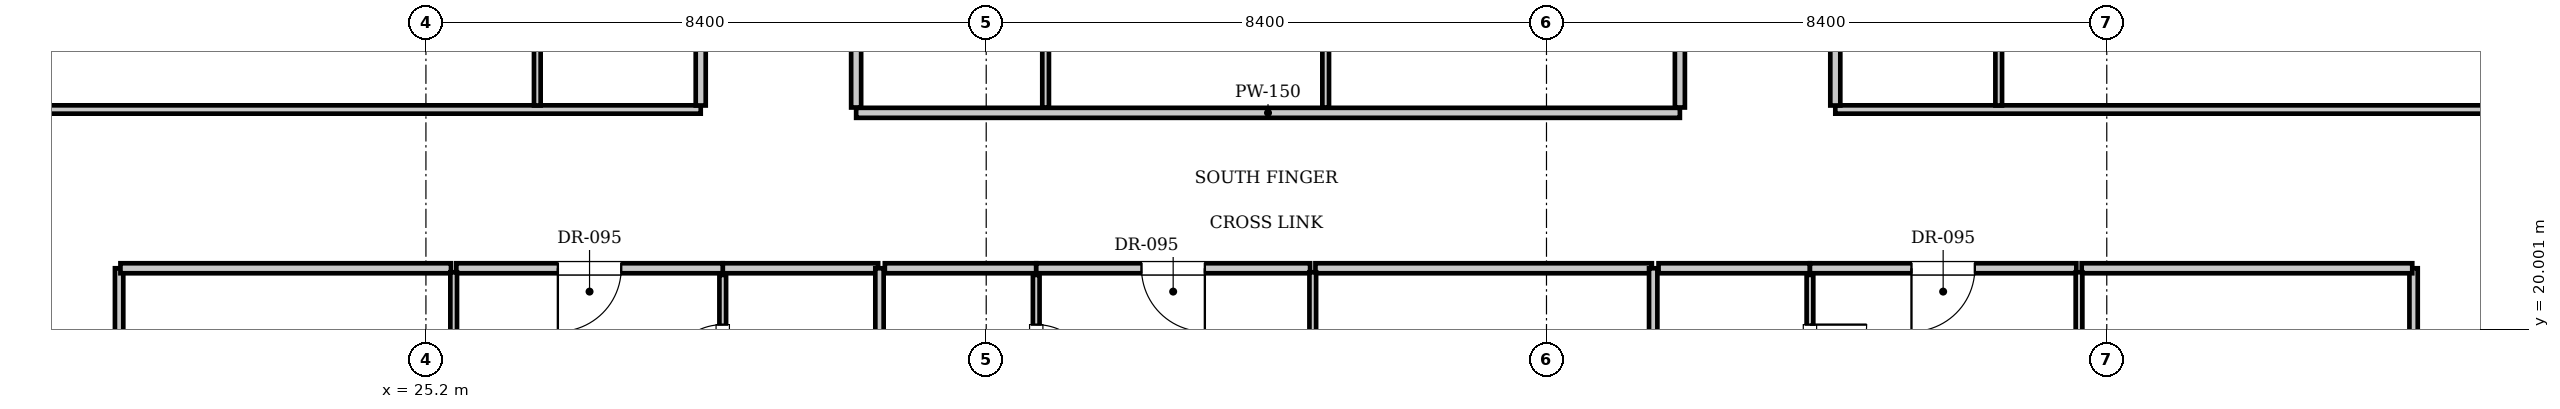
"""IFC4 building model, lengths in metres.
Left out: names, types, materials, properties, quantities, classifications, styles, units other than length and angle.
Written with IfcOpenShell. Run it as: python <this file> out.ifc"""

import sys

from ifc_helpers import new_model, si_unit, direction, frame, frame_2d, origin, place, context, subcontext, project, spatial, rectangle, extrude, element, fill, save


model = new_model("IFC4")
c1 = context("Model", 3, precision=1e-05, world=origin(), true_north=direction((0.0, 1.0)))
c2 = subcontext(c1, "Body", "Model", "MODEL_VIEW")
j1 = project(units=[si_unit("LENGTHUNIT", "METRE"), si_unit("PLANEANGLEUNIT", "RADIAN")], contexts=[c1])
p1 = place(None, origin())
s1 = spatial("IfcSite", under=j1, at=p1, CompositionType="ELEMENT")
p2 = place(p1, origin())
s2 = spatial("IfcBuilding", under=s1, at=p2, CompositionType="ELEMENT")
p3 = place(p2, frame((0.0, 0.0, 304.85)))
s3 = spatial("IfcBuildingStorey", under=s2, at=p3, CompositionType="ELEMENT", Elevation=304.85)
p4 = place(p3, frame((31.65, 23.25, 0.0), z_axis=(0.0, 0.0, 1.0), x_axis=(1.0, 0.0, 0.0)))
e1 = element("IfcWall", 1, at=p4, inside=s3, PredefinedType="PARTITIONING", context=c2, shape_type="SweptSolid", body=[
    extrude(rectangle(XDim=12.35, YDim=0.15, at=frame_2d((6.175, 0.0))), origin(), (0.0, 0.0, 1.0), 3.61),
])
for number, where, z_axis, x_axis in (
    (2, (31.65, 23.33, 0.0), (0.0, 0.0, 1.0), (0.0, 1.0, 0.0)),
    (3, (44.0, 23.33, 0.0), (0.0, 0.0, 1.0), (0.0, 1.0, 0.0)),
):
    element("IfcWall", number, at=place(p3, frame(where, z_axis=z_axis, x_axis=x_axis)), inside=s3, PredefinedType="PARTITIONING", context=c2, shape_type="SweptSolid", body=[
        extrude(rectangle(XDim=8.29, YDim=0.15, at=frame_2d((4.145, 0.0))), origin(), (0.0, 0.0, 1.0), 3.61),
    ])
for number, where, z_axis, x_axis in (
    (4, (34.49, 23.33, 0.0), (0.0, 0.0, 1.0), (0.0, 1.0, 0.0)),
    (5, (38.689, 23.33, 0.0), (0.0, 0.0, 1.0), (0.0, 1.0, 0.0)),
):
    element("IfcWall", number, at=place(p3, frame(where, z_axis=z_axis, x_axis=x_axis)), inside=s3, PredefinedType="PARTITIONING", context=c2, shape_type="SweptSolid", body=[
        extrude(rectangle(XDim=8.29, YDim=0.1, at=frame_2d((4.145, 0.0))), origin(), (0.0, 0.0, 1.0), 3.61),
    ])
for number, where, z_axis, x_axis in (
    (6, (20.6, 14.4, 0.0), (0.0, 0.0, 1.0), (0.0, 1.0, 0.0)),
    (7, (55.0, 14.4, 0.0), (0.0, 0.0, 1.0), (0.0, 1.0, 0.0)),
):
    element("IfcWall", number, at=place(p3, frame(where, z_axis=z_axis, x_axis=x_axis)), inside=s3, PredefinedType="PARTITIONING", context=c2, shape_type="SweptSolid", body=[
        extrude(rectangle(XDim=6.52, YDim=0.125, at=frame_2d((3.26, 0.0))), origin(), (0.0, 0.0, 1.0), 3.61),
    ])
p5 = place(p3, frame((29.65, 20.92, 0.0), z_axis=(0.0, 0.0, 1.0), x_axis=(1.0, 0.0, 0.0)))
e8 = element("IfcWall", 8, at=p5, inside=s3, PredefinedType="PARTITIONING", context=c2, shape_type="SweptSolid", body=[
    extrude(rectangle(XDim=2.33, YDim=0.15, at=frame_2d((1.165, 0.0))), origin(), (0.0, 0.0, 1.0), 3.61),
])
p6 = place(p3, frame((29.65, 18.48, 0.0), z_axis=(0.0, 0.0, 1.0), x_axis=(0.0, 1.0, 0.0)))
e9 = element("IfcWall", 9, at=p6, inside=s3, PredefinedType="PARTITIONING", context=c2, shape_type="SweptSolid", body=[
    extrude(rectangle(XDim=2.34, YDim=0.1, at=frame_2d((1.17, 0.0))), origin(), (0.0, 0.0, 1.0), 3.61),
])
p7 = place(p6, frame((0.745, 0.0, 0.0)))
e10 = element("IfcOpeningElement", 10, at=p7, cuts=e9, PredefinedType="OPENING", context=c2, shape_type="SweptSolid", body=[
    extrude(rectangle(XDim=0.85, YDim=2.1, at=frame_2d((0.425, 1.05))), frame((0.0, 0.06, 0.0), z_axis=(0.0, -1.0, 0.0), x_axis=(1.0, 0.0, 0.0)), (0.0, 0.0, 1.0), 0.12),
])
p8 = place(p3, frame((20.62, 20.92, 0.0), z_axis=(0.0, 0.0, 1.0), x_axis=(1.0, 0.0, 0.0)))
e11 = element("IfcWall", 11, at=p8, inside=s3, PredefinedType="PARTITIONING", context=c2, shape_type="SweptSolid", body=[
    extrude(rectangle(XDim=4.956, YDim=0.15, at=frame_2d((2.478, 0.0))), origin(), (0.0, 0.0, 1.0), 3.61),
])
p9 = place(p3, frame((25.656, 20.92, 0.0), z_axis=(0.0, 0.0, 1.0), x_axis=(1.0, 0.0, 0.0)))
e12 = element("IfcWall", 12, at=p9, inside=s3, PredefinedType="PARTITIONING", context=c2, shape_type="SweptSolid", body=[
    extrude(rectangle(XDim=3.994, YDim=0.15, at=frame_2d((1.997, 0.0))), origin(), (0.0, 0.0, 1.0), 3.61),
])
p10 = place(p9, frame((1.522, 0.0, 0.0)))
e13 = element("IfcOpeningElement", 13, at=p10, cuts=e12, PredefinedType="OPENING", context=c2, shape_type="SweptSolid", body=[
    extrude(rectangle(XDim=0.95, YDim=2.15, at=frame_2d((0.475, 1.075))), frame((0.0, 0.085, 0.0), z_axis=(0.0, -1.0, 0.0), x_axis=(1.0, 0.0, 0.0)), (0.0, 0.0, 1.0), 0.17),
])
p11 = place(p3, frame((25.616, 9.23, 0.0), z_axis=(0.0, 0.0, 1.0), x_axis=(0.0, 1.0, 0.0)))
e14 = element("IfcWall", 14, at=p11, inside=s3, PredefinedType="PARTITIONING", context=c2, shape_type="SweptSolid", body=[
    extrude(rectangle(XDim=11.63, YDim=0.1, at=frame_2d((5.815, 0.0))), origin(), (0.0, 0.0, 1.0), 3.61),
])
p12 = place(p11, frame((1.6, 0.0, 0.0)))
e15 = element("IfcOpeningElement", 15, at=p12, cuts=e14, PredefinedType="OPENING", context=c2, shape_type="SweptSolid", body=[
    extrude(rectangle(XDim=0.9, YDim=2.1, at=frame_2d((0.45, 1.05))), frame((0.0, 0.06, 0.0), z_axis=(0.0, -1.0, 0.0), x_axis=(1.0, 0.0, 0.0)), (0.0, 0.0, 1.0), 0.12),
])
p13 = place(p3, frame((32.0, 9.3, 0.0), z_axis=(0.0, 0.0, 1.0), x_axis=(0.0, 1.0, 0.0)))
e16 = element("IfcWall", 16, at=p13, inside=s3, PredefinedType="PARTITIONING", context=c2, shape_type="SweptSolid", body=[
    extrude(rectangle(XDim=11.62, YDim=0.125, at=frame_2d((5.81, 0.0))), origin(), (0.0, 0.0, 1.0), 3.61),
])
p14 = place(p3, frame((32.08, 20.92, 0.0), z_axis=(0.0, 0.0, 1.0), x_axis=(1.0, 0.0, 0.0)))
e17 = element("IfcWall", 17, at=p14, inside=s3, PredefinedType="PARTITIONING", context=c2, shape_type="SweptSolid", body=[
    extrude(rectangle(XDim=2.27, YDim=0.15, at=frame_2d((1.135, 0.0))), origin(), (0.0, 0.0, 1.0), 3.61),
])
p15 = place(p3, frame((34.35, 18.48, 0.0), z_axis=(0.0, 0.0, 1.0), x_axis=(0.0, 1.0, 0.0)))
e18 = element("IfcWall", 18, at=p15, inside=s3, PredefinedType="PARTITIONING", context=c2, shape_type="SweptSolid", body=[
    extrude(rectangle(XDim=2.34, YDim=0.1, at=frame_2d((1.17, 0.0))), origin(), (0.0, 0.0, 1.0), 3.61),
])
p16 = place(p15, frame((0.745, 0.0, 0.0)))
e19 = element("IfcOpeningElement", 19, at=p16, cuts=e18, PredefinedType="OPENING", context=c2, shape_type="SweptSolid", body=[
    extrude(rectangle(XDim=0.85, YDim=2.1, at=frame_2d((0.425, 1.05))), frame((0.0, 0.06, 0.0), z_axis=(0.0, -1.0, 0.0), x_axis=(1.0, 0.0, 0.0)), (0.0, 0.0, 1.0), 0.12),
])
p17 = place(p3, frame((34.35, 20.92, 0.0), z_axis=(0.0, 0.0, 1.0), x_axis=(1.0, 0.0, 0.0)))
e20 = element("IfcWall", 20, at=p17, inside=s3, PredefinedType="PARTITIONING", context=c2, shape_type="SweptSolid", body=[
    extrude(rectangle(XDim=4.106, YDim=0.15, at=frame_2d((2.053, 0.0))), origin(), (0.0, 0.0, 1.0), 3.61),
])
p18 = place(p17, frame((1.578, 0.0, 0.0)))
e21 = element("IfcOpeningElement", 21, at=p18, cuts=e20, PredefinedType="OPENING", context=c2, shape_type="SweptSolid", body=[
    extrude(rectangle(XDim=0.95, YDim=2.15, at=frame_2d((0.475, 1.075))), frame((0.0, 0.085, 0.0), z_axis=(0.0, -1.0, 0.0), x_axis=(1.0, 0.0, 0.0)), (0.0, 0.0, 1.0), 0.17),
])
p19 = place(p3, frame((38.536, 20.92, 0.0), z_axis=(0.0, 0.0, 1.0), x_axis=(1.0, 0.0, 0.0)))
e22 = element("IfcWall", 22, at=p19, inside=s3, PredefinedType="PARTITIONING", context=c2, shape_type="SweptSolid", body=[
    extrude(rectangle(XDim=5.044, YDim=0.15, at=frame_2d((2.522, 0.0))), origin(), (0.0, 0.0, 1.0), 3.61),
])
p20 = place(p3, frame((38.496, 9.23, 0.0), z_axis=(0.0, 0.0, 1.0), x_axis=(0.0, 1.0, 0.0)))
e23 = element("IfcWall", 23, at=p20, inside=s3, PredefinedType="PARTITIONING", context=c2, shape_type="SweptSolid", body=[
    extrude(rectangle(XDim=11.63, YDim=0.1, at=frame_2d((5.815, 0.0))), origin(), (0.0, 0.0, 1.0), 3.61),
])
p21 = place(p20, frame((1.6, 0.0, 0.0)))
e24 = element("IfcOpeningElement", 24, at=p21, cuts=e23, PredefinedType="OPENING", context=c2, shape_type="SweptSolid", body=[
    extrude(rectangle(XDim=0.9, YDim=2.1, at=frame_2d((0.45, 1.05))), frame((0.0, 0.06, 0.0), z_axis=(0.0, -1.0, 0.0), x_axis=(1.0, 0.0, 0.0)), (0.0, 0.0, 1.0), 0.12),
])
p22 = place(p3, frame((43.6, 9.3, 0.0), z_axis=(0.0, 0.0, 1.0), x_axis=(0.0, 1.0, 0.0)))
e25 = element("IfcWall", 25, at=p22, inside=s3, PredefinedType="PARTITIONING", context=c2, shape_type="SweptSolid", body=[
    extrude(rectangle(XDim=11.62, YDim=0.125, at=frame_2d((5.81, 0.0))), origin(), (0.0, 0.0, 1.0), 3.61),
])
p23 = place(p3, frame((43.68, 20.92, 0.0), z_axis=(0.0, 0.0, 1.0), x_axis=(1.0, 0.0, 0.0)))
e26 = element("IfcWall", 26, at=p23, inside=s3, PredefinedType="PARTITIONING", context=c2, shape_type="SweptSolid", body=[
    extrude(rectangle(XDim=2.27, YDim=0.15, at=frame_2d((1.135, 0.0))), origin(), (0.0, 0.0, 1.0), 3.61),
])
p24 = place(p3, frame((45.95, 18.48, 0.0), z_axis=(0.0, 0.0, 1.0), x_axis=(0.0, 1.0, 0.0)))
e27 = element("IfcWall", 27, at=p24, inside=s3, PredefinedType="PARTITIONING", context=c2, shape_type="SweptSolid", body=[
    extrude(rectangle(XDim=2.34, YDim=0.1, at=frame_2d((1.17, 0.0))), origin(), (0.0, 0.0, 1.0), 3.61),
])
p25 = place(p24, frame((0.745, 0.0, 0.0)))
e28 = element("IfcOpeningElement", 28, at=p25, cuts=e27, PredefinedType="OPENING", context=c2, shape_type="SweptSolid", body=[
    extrude(rectangle(XDim=0.85, YDim=2.1, at=frame_2d((0.425, 1.05))), frame((0.0, 0.06, 0.0), z_axis=(0.0, -1.0, 0.0), x_axis=(1.0, 0.0, 0.0)), (0.0, 0.0, 1.0), 0.12),
])
p26 = place(p3, frame((45.95, 20.92, 0.0), z_axis=(0.0, 0.0, 1.0), x_axis=(1.0, 0.0, 0.0)))
e29 = element("IfcWall", 29, at=p26, inside=s3, PredefinedType="PARTITIONING", context=c2, shape_type="SweptSolid", body=[
    extrude(rectangle(XDim=3.994, YDim=0.15, at=frame_2d((1.997, 0.0))), origin(), (0.0, 0.0, 1.0), 3.61),
])
p27 = place(p26, frame((1.522, 0.0, 0.0)))
e30 = element("IfcOpeningElement", 30, at=p27, cuts=e29, PredefinedType="OPENING", context=c2, shape_type="SweptSolid", body=[
    extrude(rectangle(XDim=0.95, YDim=2.15, at=frame_2d((0.475, 1.075))), frame((0.0, 0.085, 0.0), z_axis=(0.0, -1.0, 0.0), x_axis=(1.0, 0.0, 0.0)), (0.0, 0.0, 1.0), 0.17),
])
p28 = place(p3, frame((50.024, 20.92, 0.0), z_axis=(0.0, 0.0, 1.0), x_axis=(1.0, 0.0, 0.0)))
e31 = element("IfcWall", 31, at=p28, inside=s3, PredefinedType="PARTITIONING", context=c2, shape_type="SweptSolid", body=[
    extrude(rectangle(XDim=4.956, YDim=0.15, at=frame_2d((2.478, 0.0))), origin(), (0.0, 0.0, 1.0), 3.61),
])
p29 = place(p3, frame((49.984, 9.23, 0.0), z_axis=(0.0, 0.0, 1.0), x_axis=(0.0, 1.0, 0.0)))
e32 = element("IfcWall", 32, at=p29, inside=s3, PredefinedType="PARTITIONING", context=c2, shape_type="SweptSolid", body=[
    extrude(rectangle(XDim=11.63, YDim=0.1, at=frame_2d((5.815, 0.0))), origin(), (0.0, 0.0, 1.0), 3.61),
])
p30 = place(p29, frame((1.6, 0.0, 0.0)))
e33 = element("IfcOpeningElement", 33, at=p30, cuts=e32, PredefinedType="OPENING", context=c2, shape_type="SweptSolid", body=[
    extrude(rectangle(XDim=0.9, YDim=2.1, at=frame_2d((0.45, 1.05))), frame((0.0, 0.06, 0.0), z_axis=(0.0, -1.0, 0.0), x_axis=(1.0, 0.0, 0.0)), (0.0, 0.0, 1.0), 0.12),
])
p31 = place(p3, frame((15.5, 23.3, 0.0), z_axis=(0.0, 0.0, 1.0), x_axis=(1.0, 0.0, 0.0)))
e34 = element("IfcWall", 34, at=p31, inside=s3, PredefinedType="PARTITIONING", context=c2, shape_type="SweptSolid", body=[
    extrude(rectangle(XDim=13.82, YDim=0.125, at=frame_2d((6.91, 0.0))), origin(), (0.0, 0.0, 1.0), 3.61),
])
p32 = place(p3, frame((46.33, 23.3, 0.0), z_axis=(0.0, 0.0, 1.0), x_axis=(1.0, 0.0, 0.0)))
e35 = element("IfcWall", 35, at=p32, inside=s3, PredefinedType="PARTITIONING", context=c2, shape_type="SweptSolid", body=[
    extrude(rectangle(XDim=13.77, YDim=0.125, at=frame_2d((6.885, 0.0))), origin(), (0.0, 0.0, 1.0), 3.61),
])
p33 = place(p3, frame((29.32, 23.36, 0.0), z_axis=(0.0, 0.0, 1.0), x_axis=(0.0, 1.0, 0.0)))
e36 = element("IfcWall", 36, at=p33, inside=s3, PredefinedType="PARTITIONING", context=c2, shape_type="SweptSolid", body=[
    extrude(rectangle(XDim=1.89, YDim=0.15, at=frame_2d((0.945, 0.0))), origin(), (0.0, 0.0, 1.0), 3.61),
])
p34 = place(p3, frame((26.87, 23.36, 0.0), z_axis=(0.0, 0.0, 1.0), x_axis=(0.0, 1.0, 0.0)))
e37 = element("IfcWall", 37, at=p34, inside=s3, PredefinedType="PARTITIONING", context=c2, shape_type="SweptSolid", body=[
    extrude(rectangle(XDim=1.89, YDim=0.1, at=frame_2d((0.945, 0.0))), origin(), (0.0, 0.0, 1.0), 3.61),
])
p35 = place(p3, frame((46.33, 23.36, 0.0), z_axis=(0.0, 0.0, 1.0), x_axis=(0.0, 1.0, 0.0)))
e38 = element("IfcWall", 38, at=p35, inside=s3, PredefinedType="PARTITIONING", context=c2, shape_type="SweptSolid", body=[
    extrude(rectangle(XDim=1.89, YDim=0.15, at=frame_2d((0.945, 0.0))), origin(), (0.0, 0.0, 1.0), 3.61),
])
p36 = place(p3, frame((48.78, 23.36, 0.0), z_axis=(0.0, 0.0, 1.0), x_axis=(0.0, 1.0, 0.0)))
e39 = element("IfcWall", 39, at=p36, inside=s3, PredefinedType="PARTITIONING", context=c2, shape_type="SweptSolid", body=[
    extrude(rectangle(XDim=1.89, YDim=0.1, at=frame_2d((0.945, 0.0))), origin(), (0.0, 0.0, 1.0), 3.61),
])
p37 = place(p7, origin())
e40 = element("IfcDoor", 40, at=p37, inside=s3, OperationType="SINGLE_SWING_LEFT", PredefinedType="DOOR", context=c2, shape_type="SweptSolid", body=[
    extrude(rectangle(XDim=0.85, YDim=2.1, at=frame_2d((0.425, 1.05))), frame((0.0, 0.025, 0.0), z_axis=(0.0, -1.0, 0.0), x_axis=(1.0, 0.0, 0.0)), (0.0, 0.0, 1.0), 0.05),
])
fill(e10, e40)
p38 = place(p10, frame((0.95, 0.0, 0.0), z_axis=(0.0, 0.0, 1.0), x_axis=(-1.0, 0.0, 0.0)))
e41 = element("IfcDoor", 41, at=p38, inside=s3, OperationType="SINGLE_SWING_RIGHT", PredefinedType="DOOR", context=c2, shape_type="SweptSolid", body=[
    extrude(rectangle(XDim=0.95, YDim=2.15, at=frame_2d((0.475, 1.075))), frame((0.0, 0.025, 0.0), z_axis=(0.0, -1.0, 0.0), x_axis=(1.0, 0.0, 0.0)), (0.0, 0.0, 1.0), 0.05),
])
fill(e13, e41)
p39 = place(p16, frame((0.85, 0.0, 0.0), z_axis=(0.0, 0.0, 1.0), x_axis=(-1.0, 0.0, 0.0)))
e42 = element("IfcDoor", 42, at=p39, inside=s3, OperationType="SINGLE_SWING_RIGHT", PredefinedType="DOOR", context=c2, shape_type="SweptSolid", body=[
    extrude(rectangle(XDim=0.85, YDim=2.1, at=frame_2d((0.425, 1.05))), frame((0.0, 0.025, 0.0), z_axis=(0.0, -1.0, 0.0), x_axis=(1.0, 0.0, 0.0)), (0.0, 0.0, 1.0), 0.05),
])
fill(e19, e42)
p40 = place(p18, frame((0.95, 0.0, 0.0), z_axis=(0.0, 0.0, 1.0), x_axis=(-1.0, 0.0, 0.0)))
e43 = element("IfcDoor", 43, at=p40, inside=s3, OperationType="SINGLE_SWING_LEFT", PredefinedType="DOOR", context=c2, shape_type="SweptSolid", body=[
    extrude(rectangle(XDim=0.95, YDim=2.15, at=frame_2d((0.475, 1.075))), frame((0.0, 0.025, 0.0), z_axis=(0.0, -1.0, 0.0), x_axis=(1.0, 0.0, 0.0)), (0.0, 0.0, 1.0), 0.05),
])
fill(e21, e43)
p41 = place(p25, frame((0.85, 0.0, 0.0), z_axis=(0.0, 0.0, 1.0), x_axis=(-1.0, 0.0, 0.0)))
e44 = element("IfcDoor", 44, at=p41, inside=s3, OperationType="SINGLE_SWING_LEFT", PredefinedType="DOOR", context=c2, shape_type="SweptSolid", body=[
    extrude(rectangle(XDim=0.85, YDim=2.1, at=frame_2d((0.425, 1.05))), frame((0.0, 0.025, 0.0), z_axis=(0.0, -1.0, 0.0), x_axis=(1.0, 0.0, 0.0)), (0.0, 0.0, 1.0), 0.05),
])
fill(e28, e44)
p42 = place(p27, frame((0.95, 0.0, 0.0), z_axis=(0.0, 0.0, 1.0), x_axis=(-1.0, 0.0, 0.0)))
e45 = element("IfcDoor", 45, at=p42, inside=s3, OperationType="SINGLE_SWING_RIGHT", PredefinedType="DOOR", context=c2, shape_type="SweptSolid", body=[
    extrude(rectangle(XDim=0.95, YDim=2.15, at=frame_2d((0.475, 1.075))), frame((0.0, 0.025, 0.0), z_axis=(0.0, -1.0, 0.0), x_axis=(1.0, 0.0, 0.0)), (0.0, 0.0, 1.0), 0.05),
])
fill(e30, e45)
save(model, sys.argv[1])
